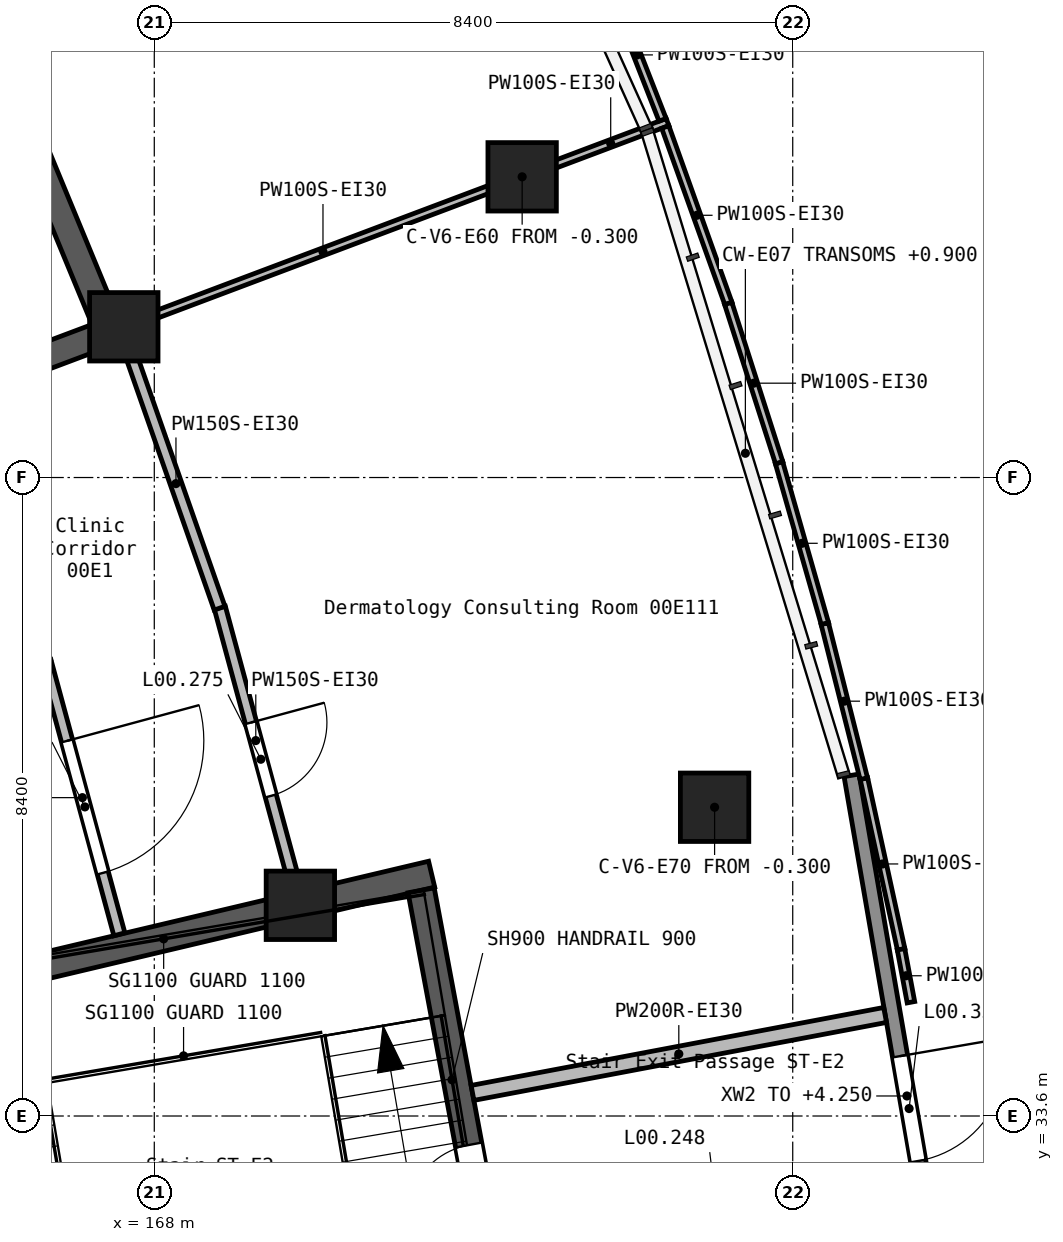
"""IFC4 building model, lengths in metres.
Left out: names, types, materials, properties, quantities, classifications, styles, units other than length and angle.
Written with IfcOpenShell. Run it as: python <this file> out.ifc"""

import sys

from ifc_helpers import new_model, si_unit, direction, frame, frame_2d, origin, origin_2d, place, context, subcontext, project, spatial, rectangle, extrude, element, fill, save


model = new_model("IFC4")
c1 = context("Model", 3, precision=1e-05, world=origin(), true_north=direction((0.0, 1.0)))
c2 = subcontext(c1, "Body", "Model", "MODEL_VIEW")
j1 = project(units=[si_unit("LENGTHUNIT", "METRE"), si_unit("PLANEANGLEUNIT", "RADIAN")], contexts=[c1])
p1 = place(None, origin())
s1 = spatial("IfcSite", under=j1, at=p1, CompositionType="ELEMENT")
p2 = place(p1, origin())
s2 = spatial("IfcBuilding", under=s1, at=p2, CompositionType="ELEMENT")
p3 = place(p2, origin())
s3 = spatial("IfcBuildingStorey", under=s2, at=p3, CompositionType="ELEMENT", Elevation=0.0)
for number, where, z_axis, x_axis in (
    (1, (167.599, 43.983, -0.3), (0.0, 0.0, 1.0), (1.0, 0.0, 0.0)),
    (2, (169.922, 36.372, -0.3), (0.0, 0.0, 1.0), (1.0, 0.0, 0.0)),
    (3, (172.84, 45.956, -0.3), (0.0, 0.0, 1.0), (1.0, 0.0, 0.0)),
    (4, (175.372, 37.662, -0.3), (0.0, 0.0, 1.0), (1.0, 0.0, 0.0)),
):
    element("IfcColumn", number, at=place(p3, frame(where, z_axis=z_axis, x_axis=x_axis)), inside=s3, PredefinedType="COLUMN", context=c2, shape_type="SweptSolid", body=[
        extrude(rectangle(XDim=0.9, YDim=0.9, at=origin_2d()), origin(), (0.0, 0.0, 1.0), 5.7),
    ])
p4 = place(p3, frame((162.194, 41.949, -0.3), z_axis=(0.0, 0.0, 1.0), x_axis=(0.935920223106, 0.352212061095, 0.0)))
e5 = element("IfcWall", 5, at=p4, inside=s3, PredefinedType="SHEAR", context=c2, shape_type="SweptSolid", body=[
    extrude(rectangle(XDim=5.75, YDim=0.35, at=frame_2d((2.875, 0.0))), origin(), (0.0, 0.0, 1.0), 5.7),
])
p5 = place(p3, frame((164.303, 35.042, -0.3), z_axis=(0.0, 0.0, 1.0), x_axis=(0.973093454504, 0.230410782737, 0.0)))
e6 = element("IfcWall", 6, at=p5, inside=s3, PredefinedType="SHEAR", context=c2, shape_type="SweptSolid", body=[
    extrude(rectangle(XDim=7.55, YDim=0.35, at=frame_2d((3.775, 0.0))), origin(), (0.0, 0.0, 1.0), 5.7),
])
p6 = place(p3, frame((167.345, 44.075, -0.3), z_axis=(0.0, 0.0, 1.0), x_axis=(-0.382046231428, 0.924143212415, 0.0)))
e7 = element("IfcWall", 7, at=p6, inside=s3, PredefinedType="SHEAR", context=c2, shape_type="SweptSolid", body=[
    extrude(rectangle(XDim=3.788, YDim=0.35, at=frame_2d((1.894, 0.0))), origin(), (0.0, 0.0, 1.0), 5.7),
])
p7 = place(p3, frame((172.602, 30.727, -0.3), z_axis=(0.0, 0.0, 1.0), x_axis=(-0.18353204361, 0.983013727762, 0.0)))
e8 = element("IfcWall", 8, at=p7, inside=s3, PredefinedType="SHEAR", context=c2, shape_type="SweptSolid", body=[
    extrude(rectangle(XDim=5.944, YDim=0.35, at=frame_2d((2.972, 0.0))), origin(), (0.0, 0.0, 1.0), 5.7),
])
p8 = place(p7, frame((1.535, 0.0, 0.3)))
e9 = element("IfcOpeningElement", 9, at=p8, cuts=e8, PredefinedType="OPENING", context=c2, shape_type="SweptSolid", body=[
    extrude(rectangle(XDim=1.0, YDim=2.1, at=frame_2d((0.5, 1.05))), frame((0.0, 0.185, 0.0), z_axis=(0.0, -1.0, 0.0), x_axis=(1.0, 0.0, 0.0)), (0.0, 0.0, 1.0), 0.37),
])
p9 = place(p3, frame((177.174, 38.082, 0.0), z_axis=(0.0, 0.0, 1.0), x_axis=(0.17017618712, -0.985413651893, 0.0)))
e10 = element("IfcWall", 10, at=p9, inside=s3, PredefinedType="STANDARD", context=c2, shape_type="SweptSolid", body=[
    extrude(rectangle(XDim=8.562, YDim=0.2, at=frame_2d((4.281, 0.0))), origin(), (0.0, 0.0, 1.0), 4.25),
])
p10 = place(p9, frame((3.749, 0.0, 0.0)))
e11 = element("IfcOpeningElement", 11, at=p10, cuts=e10, PredefinedType="OPENING", context=c2, shape_type="SweptSolid", body=[
    extrude(rectangle(XDim=1.4, YDim=2.1, at=frame_2d((0.7, 1.05))), frame((0.0, 0.11, 0.0), z_axis=(0.0, -1.0, 0.0), x_axis=(1.0, 0.0, 0.0)), (0.0, 0.0, 1.0), 0.22),
])
p11 = place(p3, frame((172.187, 33.904, 0.0), z_axis=(0.0, 0.0, 1.0), x_axis=(0.982623653884, 0.185609145325, 0.0)))
e12 = element("IfcWall", 12, at=p11, inside=s3, PredefinedType="SOLIDWALL", context=c2, shape_type="SweptSolid", body=[
    extrude(rectangle(XDim=5.524, YDim=0.2, at=frame_2d((2.762, 0.0))), origin(), (0.0, 0.0, 1.0), 5.05),
])
p12 = place(p3, frame((168.862, 40.287, 0.0), z_axis=(0.0, 0.0, 1.0), x_axis=(0.261268938462, -0.965266047157, 0.0)))
e13 = element("IfcWall", 13, at=p12, inside=s3, PredefinedType="PARTITIONING", context=c2, shape_type="SweptSolid", body=[
    extrude(rectangle(XDim=3.622, YDim=0.15, at=frame_2d((1.811, 0.0))), origin(), (0.0, 0.0, 1.0), 5.05),
])
p13 = place(p12, frame((1.566, 0.0, 0.0)))
e14 = element("IfcOpeningElement", 14, at=p13, cuts=e13, PredefinedType="OPENING", context=c2, shape_type="SweptSolid", body=[
    extrude(rectangle(XDim=1.0, YDim=2.1, at=frame_2d((0.5, 1.05))), frame((0.0, 0.085, 0.0), z_axis=(0.0, -1.0, 0.0), x_axis=(1.0, 0.0, 0.0)), (0.0, 0.0, 1.0), 0.17),
])
p14 = place(p3, frame((167.711, 43.559, 0.0), z_axis=(0.0, 0.0, 1.0), x_axis=(0.330491338893, -0.9438090246, 0.0)))
e15 = element("IfcWall", 15, at=p14, inside=s3, PredefinedType="PARTITIONING", context=c2, shape_type="SweptSolid", body=[
    extrude(rectangle(XDim=3.473, YDim=0.15, at=frame_2d((1.736, 0.0))), origin(), (0.0, 0.0, 1.0), 5.05),
])
p15 = place(p3, frame((166.567, 39.586, 0.0), z_axis=(0.0, 0.0, 1.0), x_axis=(0.261225938755, -0.965277684877, 0.0)))
e16 = element("IfcWall", 16, at=p15, inside=s3, PredefinedType="PARTITIONING", context=c2, shape_type="SweptSolid", body=[
    extrude(rectangle(XDim=3.725, YDim=0.15, at=frame_2d((1.863, 0.0))), origin(), (0.0, 0.0, 1.0), 5.05),
])
p16 = place(p15, frame((1.089, 0.0, 0.0)))
e17 = element("IfcOpeningElement", 17, at=p16, cuts=e16, PredefinedType="OPENING", context=c2, shape_type="SweptSolid", body=[
    extrude(rectangle(XDim=1.8, YDim=2.1, at=frame_2d((0.9, 1.05))), frame((0.0, 0.085, 0.0), z_axis=(0.0, -1.0, 0.0), x_axis=(1.0, 0.0, 0.0)), (0.0, 0.0, 1.0), 0.17),
])
p17 = place(p3, frame((168.016, 44.14, 0.0), z_axis=(0.0, 0.0, 1.0), x_axis=(0.935850976525, 0.352396012659, 0.0)))
e18 = element("IfcWall", 18, at=p17, inside=s3, PredefinedType="PARTITIONING", context=c2, shape_type="SweptSolid", body=[
    extrude(rectangle(XDim=4.708, YDim=0.1, at=frame_2d((2.354, 0.0))), origin(), (0.0, 0.0, 1.0), 5.05),
])
p18 = place(p3, frame((173.257, 46.114, 0.0), z_axis=(0.0, 0.0, 1.0), x_axis=(0.93586999438, 0.35234550319, 0.0)))
e19 = element("IfcWall", 19, at=p18, inside=s3, PredefinedType="PARTITIONING", context=c2, shape_type="SweptSolid", body=[
    extrude(rectangle(XDim=1.598, YDim=0.1, at=frame_2d((0.799, 0.0))), origin(), (0.0, 0.0, 1.0), 5.05),
])
p19 = place(p3, frame((174.723, 46.611, 0.0), z_axis=(0.0, 0.0, 1.0), x_axis=(0.336762779461, -0.94158952329, 0.0)))
e20 = element("IfcWall", 20, at=p19, inside=s3, PredefinedType="PARTITIONING", context=c2, shape_type="SweptSolid", body=[
    extrude(rectangle(XDim=2.466, YDim=0.1, at=frame_2d((1.233, 0.0))), origin(), (0.0, 0.0, 1.0), 5.05),
])
p20 = place(p3, frame((177.336, 38.04, 0.0), z_axis=(0.0, 0.0, 1.0), x_axis=(0.213187334012, -0.977011341089, 0.0)))
e21 = element("IfcWall", 21, at=p20, inside=s3, PredefinedType="PARTITIONING", context=c2, shape_type="SweptSolid", body=[
    extrude(rectangle(XDim=2.301, YDim=0.1, at=frame_2d((1.15, 0.0))), origin(), (0.0, 0.0, 1.0), 5.05),
])
p21 = place(p3, frame((175.552, 44.29, 0.0), z_axis=(0.0, 0.0, 1.0), x_axis=(0.304461914253, -0.952524510325, 0.0)))
e22 = element("IfcWall", 22, at=p21, inside=s3, PredefinedType="PARTITIONING", context=c2, shape_type="SweptSolid", body=[
    extrude(rectangle(XDim=2.202, YDim=0.1, at=frame_2d((1.101, 0.0))), origin(), (0.0, 0.0, 1.0), 5.05),
])
p22 = place(p3, frame((176.22, 42.193, 0.0), z_axis=(0.0, 0.0, 1.0), x_axis=(0.274105977671, -0.961699492048, 0.0)))
e23 = element("IfcWall", 23, at=p22, inside=s3, PredefinedType="PARTITIONING", context=c2, shape_type="SweptSolid", body=[
    extrude(rectangle(XDim=2.202, YDim=0.1, at=frame_2d((1.101, 0.0))), origin(), (0.0, 0.0, 1.0), 5.05),
])
p23 = place(p3, frame((176.822, 40.077, 0.0), z_axis=(0.0, 0.0, 1.0), x_axis=(0.244201941447, -0.969724399917, 0.0)))
e24 = element("IfcWall", 24, at=p23, inside=s3, PredefinedType="PARTITIONING", context=c2, shape_type="SweptSolid", body=[
    extrude(rectangle(XDim=2.103, YDim=0.1, at=frame_2d((1.051, 0.0))), origin(), (0.0, 0.0, 1.0), 5.05),
])
p24 = place(p3, frame((174.02, 48.414, 0.0), z_axis=(0.0, 0.0, 1.0), x_axis=(0.364148326517, -0.931340966722, 0.0)))
e25 = element("IfcWall", 25, at=p24, inside=s3, PredefinedType="PARTITIONING", context=c2, shape_type="SweptSolid", body=[
    extrude(rectangle(XDim=1.834, YDim=0.1, at=frame_2d((0.917, 0.0))), origin(), (0.0, 0.0, 1.0), 5.05),
])
p25 = place(p3, frame((177.825, 35.793, 0.0), z_axis=(0.0, 0.0, 1.0), x_axis=(0.184038826222, -0.982918974505, 0.0)))
e26 = element("IfcWall", 26, at=p25, inside=s3, PredefinedType="PARTITIONING", context=c2, shape_type="SweptSolid", body=[
    extrude(rectangle(XDim=0.708, YDim=0.1, at=frame_2d((0.354, 0.0))), origin(), (0.0, 0.0, 1.0), 5.05),
])
p26 = place(p10, origin())
e27 = element("IfcDoor", 27, at=p26, inside=s3, OperationType="SINGLE_SWING_LEFT", PredefinedType="DOOR", context=c2, shape_type="SweptSolid", body=[
    extrude(rectangle(XDim=1.4, YDim=2.1, at=frame_2d((0.7, 1.05))), frame((0.0, 0.025, 0.0), z_axis=(0.0, -1.0, 0.0), x_axis=(1.0, 0.0, 0.0)), (0.0, 0.0, 1.0), 0.05),
])
fill(e11, e27)
p27 = place(p16, origin())
e28 = element("IfcDoor", 28, at=p27, inside=s3, OperationType="DOUBLE_DOOR_SINGLE_SWING", PredefinedType="DOOR", context=c2, shape_type="SweptSolid", body=[
    extrude(rectangle(XDim=1.8, YDim=2.1, at=frame_2d((0.9, 1.05))), frame((0.0, 0.025, 0.0), z_axis=(0.0, -1.0, 0.0), x_axis=(1.0, 0.0, 0.0)), (0.0, 0.0, 1.0), 0.05),
])
fill(e17, e28)
p28 = place(p8, frame((1.0, 0.0, 0.0), z_axis=(0.0, 0.0, 1.0), x_axis=(-1.0, 0.0, 0.0)))
e29 = element("IfcDoor", 29, at=p28, inside=s3, OperationType="SINGLE_SWING_RIGHT", PredefinedType="DOOR", context=c2, shape_type="SweptSolid", body=[
    extrude(rectangle(XDim=1.0, YDim=2.1, at=frame_2d((0.5, 1.05))), frame((0.0, 0.025, 0.0), z_axis=(0.0, -1.0, 0.0), x_axis=(1.0, 0.0, 0.0)), (0.0, 0.0, 1.0), 0.05),
])
fill(e9, e29)
p29 = place(p13, origin())
e30 = element("IfcDoor", 30, at=p29, inside=s3, OperationType="SINGLE_SWING_RIGHT", PredefinedType="DOOR", context=c2, shape_type="SweptSolid", body=[
    extrude(rectangle(XDim=1.0, YDim=2.1, at=frame_2d((0.5, 1.05))), frame((0.0, 0.025, 0.0), z_axis=(0.0, -1.0, 0.0), x_axis=(1.0, 0.0, 0.0)), (0.0, 0.0, 1.0), 0.05),
])
fill(e14, e30)
save(model, sys.argv[1])
